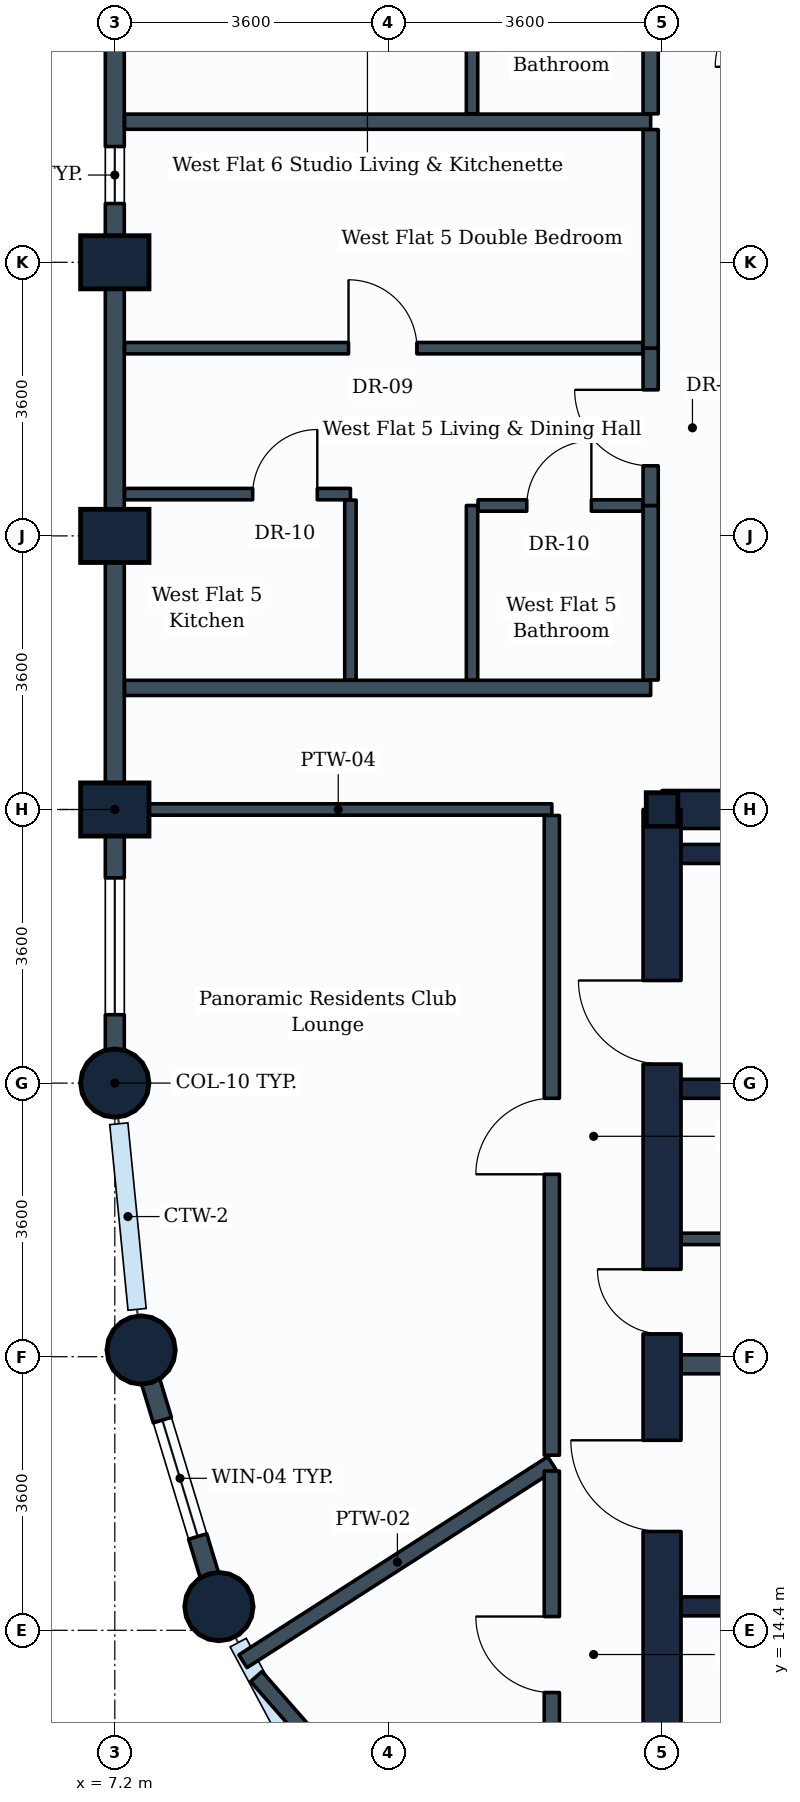
"""IFC4 building model, lengths in metres.
Left out: names, types, materials, properties, quantities, classifications, styles, units other than length and angle.
Written with IfcOpenShell. Run it as: python <this file> out.ifc"""

import sys

from ifc_helpers import new_model, si_unit, direction, frame, frame_2d, origin, origin_2d, place, context, subcontext, project, spatial, rectangle, circle, i_section, extrude, element, fill, save


model = new_model("IFC4")
c1 = context("Model", 3, precision=1e-05, world=origin(), true_north=direction((0.0, 1.0)))
c2 = subcontext(c1, "Body", "Model", "MODEL_VIEW")
j1 = project(units=[si_unit("LENGTHUNIT", "METRE"), si_unit("PLANEANGLEUNIT", "RADIAN")], contexts=[c1])
p1 = place(None, origin())
s1 = spatial("IfcSite", under=j1, at=p1, CompositionType="ELEMENT")
p2 = place(p1, origin())
s2 = spatial("IfcBuilding", under=s1, at=p2, CompositionType="ELEMENT")
p3 = place(p2, frame((0.0, 0.0, 182.4)))
s3 = spatial("IfcBuildingStorey", under=s2, at=p3, CompositionType="ELEMENT", Elevation=182.4)
p4 = place(p3, frame((7.2, 21.6, 0.0), z_axis=(0.0, 0.0, 1.0), x_axis=(1.0, 0.0, 0.0)))
e1 = element("IfcColumn", 1, at=p4, inside=s3, PredefinedType="COLUMN", context=c2, shape_type="SweptSolid", body=[
    extrude(circle(Radius=0.45, at=origin_2d()), origin(), (0.0, 0.0, 1.0), 3.8),
])
for number, where, z_axis, x_axis in (
    (2, (7.2, 25.2, 0.0), (0.0, 0.0, 1.0), (0.0, 1.0, 0.0)),
    (3, (7.2, 28.8, 0.0), (0.0, 0.0, 1.0), (0.0, 1.0, 0.0)),
    (4, (7.2, 32.4, 0.0), (0.0, 0.0, 1.0), (0.0, 1.0, 0.0)),
):
    element("IfcColumn", number, at=place(p3, frame(where, z_axis=z_axis, x_axis=x_axis)), inside=s3, PredefinedType="COLUMN", context=c2, shape_type="SweptSolid", body=[
        extrude(rectangle(XDim=0.7, YDim=0.9, at=origin_2d()), origin(), (0.0, 0.0, 1.0), 3.8),
    ])
for number, where, z_axis, x_axis in (
    (5, (7.546, 18.088, 0.0), (0.0, 0.0, 1.0), (1.0, 0.0, 0.0)),
    (6, (8.57, 14.712, 0.0), (0.0, 0.0, 1.0), (1.0, 0.0, 0.0)),
):
    element("IfcColumn", number, at=place(p3, frame(where, z_axis=z_axis, x_axis=x_axis)), inside=s3, PredefinedType="COLUMN", context=c2, shape_type="SweptSolid", body=[
        extrude(circle(Radius=0.45, at=origin_2d()), origin(), (0.0, 0.0, 1.0), 3.8),
    ])
p5 = place(p3, frame((14.4, 25.2, 0.0), z_axis=(0.0, 0.0, 1.0), x_axis=(1.0, 0.0, 0.0)))
e7 = element("IfcColumn", 7, at=p5, inside=s3, PredefinedType="COLUMN", context=c2, shape_type="SweptSolid", body=[
    extrude(i_section(OverallWidth=0.416, OverallDepth=0.442, WebThickness=0.025, FlangeThickness=0.041, FilletRadius=0.015, at=origin_2d()), origin(), (0.0, 0.0, 1.0), 3.8),
])
p6 = place(p3, frame((7.2, 32.4, 0.0), z_axis=(0.0, 0.0, 1.0), x_axis=(0.0, 1.0, 0.0)))
e8 = element("IfcWall", 8, at=p6, inside=s3, PredefinedType="STANDARD", context=c2, shape_type="SweptSolid", body=[
    extrude(rectangle(XDim=3.6, YDim=0.25, at=frame_2d((1.8, 0.0))), origin(), (0.0, 0.0, 1.0), 2.93),
])
p7 = place(p6, frame((0.773, 0.0, 0.85)))
e9 = element("IfcOpeningElement", 9, at=p7, cuts=e8, PredefinedType="OPENING", context=c2, shape_type="SweptSolid", body=[
    extrude(rectangle(XDim=0.75, YDim=1.05, at=frame_2d((0.375, 0.525))), frame((0.0, 0.135, 0.0), z_axis=(0.0, -1.0, 0.0), x_axis=(1.0, 0.0, 0.0)), (0.0, 0.0, 1.0), 0.27),
])
p8 = place(p3, frame((7.2, 28.8, 0.0), z_axis=(0.0, 0.0, 1.0), x_axis=(0.0, 1.0, 0.0)))
e10 = element("IfcWall", 10, at=p8, inside=s3, PredefinedType="STANDARD", context=c2, shape_type="SweptSolid", body=[
    extrude(rectangle(XDim=3.6, YDim=0.25, at=frame_2d((1.8, 0.0))), origin(), (0.0, 0.0, 1.0), 2.93),
])
p9 = place(p3, frame((7.2, 25.2, 0.0), z_axis=(0.0, 0.0, 1.0), x_axis=(0.0, 1.0, 0.0)))
e11 = element("IfcWall", 11, at=p9, inside=s3, PredefinedType="STANDARD", context=c2, shape_type="SweptSolid", body=[
    extrude(rectangle(XDim=3.6, YDim=0.25, at=frame_2d((1.8, 0.0))), origin(), (0.0, 0.0, 1.0), 2.93),
])
p10 = place(p3, frame((7.2, 21.6, 0.0), z_axis=(0.0, 0.0, 1.0), x_axis=(0.0, 1.0, 0.0)))
e12 = element("IfcWall", 12, at=p10, inside=s3, PredefinedType="STANDARD", context=c2, shape_type="SweptSolid", body=[
    extrude(rectangle(XDim=3.6, YDim=0.25, at=frame_2d((1.8, 0.0))), origin(), (0.0, 0.0, 1.0), 2.93),
])
p11 = place(p10, frame((0.9, 0.0, 0.85)))
e13 = element("IfcOpeningElement", 13, at=p11, cuts=e12, PredefinedType="OPENING", context=c2, shape_type="SweptSolid", body=[
    extrude(rectangle(XDim=1.8, YDim=1.35, at=frame_2d((0.9, 0.675))), frame((0.0, 0.135, 0.0), z_axis=(0.0, -1.0, 0.0), x_axis=(1.0, 0.0, 0.0)), (0.0, 0.0, 1.0), 0.27),
])
p12 = place(p3, frame((8.57, 14.712, 0.0), z_axis=(0.0, 0.0, 1.0), x_axis=(-0.290305086481, 0.956934144423, 0.0)))
e14 = element("IfcWall", 14, at=p12, inside=s3, PredefinedType="STANDARD", context=c2, shape_type="SweptSolid", body=[
    extrude(rectangle(XDim=3.528, YDim=0.25, at=frame_2d((1.764, 0.0))), origin(), (0.0, 0.0, 1.0), 2.93),
])
p13 = place(p12, frame((0.964, 0.0, 0.85)))
e15 = element("IfcOpeningElement", 15, at=p13, cuts=e14, PredefinedType="OPENING", context=c2, shape_type="SweptSolid", body=[
    extrude(rectangle(XDim=1.6, YDim=1.35, at=frame_2d((0.8, 0.675))), frame((0.0, 0.135, 0.0), z_axis=(0.0, -1.0, 0.0), x_axis=(1.0, 0.0, 0.0)), (0.0, 0.0, 1.0), 0.27),
])
p14 = place(p3, frame((14.4, 25.2, 0.0), z_axis=(0.0, 0.0, 1.0), x_axis=(1.0, 0.0, 0.0)))
e16 = element("IfcWall", 16, at=p14, inside=s3, PredefinedType="SHEAR", context=c2, shape_type="SweptSolid", body=[
    extrude(rectangle(XDim=10.8, YDim=0.5, at=frame_2d((5.4, 0.0))), origin(), (0.0, 0.0, 1.0), 3.55),
])
p15 = place(p3, frame((14.4, 10.8, 0.0), z_axis=(0.0, 0.0, 1.0), x_axis=(0.0, 1.0, 0.0)))
e17 = element("IfcWall", 17, at=p15, inside=s3, PredefinedType="SHEAR", context=c2, shape_type="SweptSolid", body=[
    extrude(rectangle(XDim=14.4, YDim=0.5, at=frame_2d((7.2, 0.0))), origin(), (0.0, 0.0, 1.0), 3.55),
])
p16 = place(p15, frame((11.05, 0.0, 0.0)))
e18 = element("IfcOpeningElement", 18, at=p16, cuts=e17, PredefinedType="OPENING", context=c2, shape_type="SweptSolid", body=[
    extrude(rectangle(XDim=1.1, YDim=2.1, at=frame_2d((0.55, 1.05))), frame((0.0, 0.26, 0.0), z_axis=(0.0, -1.0, 0.0), x_axis=(1.0, 0.0, 0.0)), (0.0, 0.0, 1.0), 0.52),
])
p17 = place(p15, frame((4.9, 0.0, 0.0)))
e19 = element("IfcOpeningElement", 19, at=p17, cuts=e17, PredefinedType="OPENING", context=c2, shape_type="SweptSolid", body=[
    extrude(rectangle(XDim=1.2, YDim=2.1, at=frame_2d((0.6, 1.05))), frame((0.0, 0.26, 0.0), z_axis=(0.0, -1.0, 0.0), x_axis=(1.0, 0.0, 0.0)), (0.0, 0.0, 1.0), 0.52),
])
p18 = place(p15, frame((7.5, 0.0, 0.0)))
e20 = element("IfcOpeningElement", 20, at=p18, cuts=e17, PredefinedType="OPENING", context=c2, shape_type="SweptSolid", body=[
    extrude(rectangle(XDim=0.85, YDim=2.1, at=frame_2d((0.425, 1.05))), frame((0.0, 0.26, 0.0), z_axis=(0.0, -1.0, 0.0), x_axis=(1.0, 0.0, 0.0)), (0.0, 0.0, 1.0), 0.52),
])
p19 = place(p3, frame((14.65, 14.715, 0.0), z_axis=(0.0, 0.0, 1.0), x_axis=(1.0, 0.0, 0.0)))
e21 = element("IfcWall", 21, at=p19, inside=s3, PredefinedType="SHEAR", context=c2, shape_type="SweptSolid", body=[
    extrude(rectangle(XDim=8.7, YDim=0.25, at=frame_2d((4.35, 0.0))), origin(), (0.0, 0.0, 1.0), 3.55),
])
p20 = place(p19, frame((0.705, 0.0, 0.0)))
e22 = element("IfcOpeningElement", 22, at=p20, cuts=e21, PredefinedType="OPENING", context=c2, shape_type="SweptSolid", body=[
    extrude(rectangle(XDim=1.1, YDim=2.1, at=frame_2d((0.55, 1.05))), frame((0.0, 0.135, 0.0), z_axis=(0.0, -1.0, 0.0), x_axis=(1.0, 0.0, 0.0)), (0.0, 0.0, 1.0), 0.27),
])
for number, where, z_axis, x_axis in (
    (23, (14.65, 21.525, 0.0), (0.0, 0.0, 1.0), (1.0, 0.0, 0.0)),
    (24, (14.65, 24.615, 0.0), (0.0, 0.0, 1.0), (1.0, 0.0, 0.0)),
):
    element("IfcWall", number, at=place(p3, frame(where, z_axis=z_axis, x_axis=x_axis)), inside=s3, PredefinedType="SHEAR", context=c2, shape_type="SweptSolid", body=[
        extrude(rectangle(XDim=8.25, YDim=0.25, at=frame_2d((4.125, 0.0))), origin(), (0.0, 0.0, 1.0), 3.55),
    ])
p21 = place(p3, frame((14.65, 17.9, 0.0), z_axis=(0.0, 0.0, 1.0), x_axis=(1.0, 0.0, 0.0)))
e25 = element("IfcWall", 25, at=p21, inside=s3, PredefinedType="PARTITIONING", context=c2, shape_type="SweptSolid", body=[
    extrude(rectangle(XDim=7.15, YDim=0.25, at=frame_2d((3.575, 0.0))), origin(), (0.0, 0.0, 1.0), 3.535),
])
p22 = place(p3, frame((14.65, 19.55, 0.0), z_axis=(0.0, 0.0, 1.0), x_axis=(1.0, 0.0, 0.0)))
e26 = element("IfcWall", 26, at=p22, inside=s3, PredefinedType="PARTITIONING", context=c2, shape_type="SweptSolid", body=[
    extrude(rectangle(XDim=8.0, YDim=0.15, at=frame_2d((4.0, 0.0))), origin(), (0.0, 0.0, 1.0), 3.535),
])
p23 = place(p3, frame((7.329, 25.2, 0.0), z_axis=(0.0, 0.0, 1.0), x_axis=(1.0, 0.0, 0.0)))
e27 = element("IfcWall", 27, at=p23, inside=s3, PredefinedType="PARTITIONING", context=c2, shape_type="SweptSolid", body=[
    extrude(rectangle(XDim=5.621, YDim=0.15, at=frame_2d((2.811, 0.0))), origin(), (0.0, 0.0, 1.0), 3.535),
])
p24 = place(p3, frame((12.95, 9.35, 0.0), z_axis=(0.0, 0.0, 1.0), x_axis=(-0.658627575343, 0.752469080426, 0.0)))
e28 = element("IfcWall", 28, at=p24, inside=s3, PredefinedType="PARTITIONING", context=c2, shape_type="SweptSolid", body=[
    extrude(rectangle(XDim=5.903, YDim=0.2, at=frame_2d((2.952, 0.0))), origin(), (0.0, 0.0, 1.0), 2.93),
])
p25 = place(p3, frame((12.95, 16.6, 0.0), z_axis=(0.0, 0.0, 1.0), x_axis=(-0.841684109651, -0.539970239515, 0.0)))
e29 = element("IfcWall", 29, at=p25, inside=s3, PredefinedType="PARTITIONING", context=c2, shape_type="SweptSolid", body=[
    extrude(rectangle(XDim=4.828, YDim=0.2, at=frame_2d((2.414, 0.0))), origin(), (0.0, 0.0, 1.0), 2.93),
])
p26 = place(p3, frame((12.95, 16.704, 0.0), z_axis=(0.0, 0.0, 1.0), x_axis=(0.0, 1.0, 0.0)))
e30 = element("IfcWall", 30, at=p26, inside=s3, PredefinedType="PARTITIONING", context=c2, shape_type="SweptSolid", body=[
    extrude(rectangle(XDim=8.417, YDim=0.2, at=frame_2d((4.208, 0.0))), origin(), (0.0, 0.0, 1.0), 3.22),
])
p27 = place(p26, frame((3.696, 0.0, 0.0)))
e31 = element("IfcOpeningElement", 31, at=p27, cuts=e30, PredefinedType="OPENING", context=c2, shape_type="SweptSolid", body=[
    extrude(rectangle(XDim=1.0, YDim=2.1, at=frame_2d((0.5, 1.05))), frame((0.0, 0.11, 0.0), z_axis=(0.0, -1.0, 0.0), x_axis=(1.0, 0.0, 0.0)), (0.0, 0.0, 1.0), 0.22),
])
p28 = place(p3, frame((12.95, 9.623, 0.0), z_axis=(0.0, 0.0, 1.0), x_axis=(0.0, 1.0, 0.0)))
e32 = element("IfcWall", 32, at=p28, inside=s3, PredefinedType="PARTITIONING", context=c2, shape_type="SweptSolid", body=[
    extrude(rectangle(XDim=6.873, YDim=0.2, at=frame_2d((3.437, 0.0))), origin(), (0.0, 0.0, 1.0), 3.17),
])
p29 = place(p28, frame((3.958, 0.0, 0.0)))
e33 = element("IfcOpeningElement", 33, at=p29, cuts=e32, PredefinedType="OPENING", context=c2, shape_type="SweptSolid", body=[
    extrude(rectangle(XDim=1.0, YDim=2.1, at=frame_2d((0.5, 1.05))), frame((0.0, 0.11, 0.0), z_axis=(0.0, -1.0, 0.0), x_axis=(1.0, 0.0, 0.0)), (0.0, 0.0, 1.0), 0.22),
])
for number, where, z_axis, x_axis in (
    (34, (7.329, 26.8, 0.0), (0.0, 0.0, 1.0), (1.0, 0.0, 0.0)),
    (35, (7.329, 34.25, 0.0), (0.0, 0.0, 1.0), (1.0, 0.0, 0.0)),
):
    element("IfcWall", number, at=place(p3, frame(where, z_axis=z_axis, x_axis=x_axis)), inside=s3, PredefinedType="PARTITIONING", context=c2, shape_type="SweptSolid", body=[
        extrude(rectangle(XDim=6.921, YDim=0.2, at=frame_2d((3.46, 0.0))), origin(), (0.0, 0.0, 1.0), 2.93),
    ])
p30 = place(p3, frame((14.25, 26.904, 0.0), z_axis=(0.0, 0.0, 1.0), x_axis=(0.0, 1.0, 0.0)))
e36 = element("IfcWall", 36, at=p30, inside=s3, PredefinedType="PARTITIONING", context=c2, shape_type="SweptSolid", body=[
    extrude(rectangle(XDim=2.296, YDim=0.2, at=frame_2d((1.148, 0.0))), origin(), (0.0, 0.0, 1.0), 3.17),
])
p31 = place(p3, frame((11.9, 26.904, 0.0), z_axis=(0.0, 0.0, 1.0), x_axis=(0.0, 1.0, 0.0)))
e37 = element("IfcWall", 37, at=p31, inside=s3, PredefinedType="PARTITIONING", context=c2, shape_type="SweptSolid", body=[
    extrude(rectangle(XDim=2.296, YDim=0.15, at=frame_2d((1.148, 0.0))), origin(), (0.0, 0.0, 1.0), 3.22),
])
p32 = place(p3, frame((11.979, 29.2, 0.0), z_axis=(0.0, 0.0, 1.0), x_axis=(1.0, 0.0, 0.0)))
e38 = element("IfcWall", 38, at=p32, inside=s3, PredefinedType="PARTITIONING", context=c2, shape_type="SweptSolid", body=[
    extrude(rectangle(XDim=2.167, YDim=0.15, at=frame_2d((1.083, 0.0))), origin(), (0.0, 0.0, 1.0), 3.535),
])
p33 = place(p32, frame((0.641, 0.0, 0.0)))
e39 = element("IfcOpeningElement", 39, at=p33, cuts=e38, PredefinedType="OPENING", context=c2, shape_type="SweptSolid", body=[
    extrude(rectangle(XDim=0.85, YDim=2.1, at=frame_2d((0.425, 1.05))), frame((0.0, 0.085, 0.0), z_axis=(0.0, -1.0, 0.0), x_axis=(1.0, 0.0, 0.0)), (0.0, 0.0, 1.0), 0.17),
])
p34 = place(p3, frame((14.25, 29.2, 0.0), z_axis=(0.0, 0.0, 1.0), x_axis=(0.0, 1.0, 0.0)))
e40 = element("IfcWall", 40, at=p34, inside=s3, PredefinedType="PARTITIONING", context=c2, shape_type="SweptSolid", body=[
    extrude(rectangle(XDim=2.07, YDim=0.2, at=frame_2d((1.035, 0.0))), origin(), (0.0, 0.0, 1.0), 3.17),
])
p35 = place(p34, frame((0.522, 0.0, 0.0)))
e41 = element("IfcOpeningElement", 41, at=p35, cuts=e40, PredefinedType="OPENING", context=c2, shape_type="SweptSolid", body=[
    extrude(rectangle(XDim=1.0, YDim=2.1, at=frame_2d((0.5, 1.05))), frame((0.0, 0.11, 0.0), z_axis=(0.0, -1.0, 0.0), x_axis=(1.0, 0.0, 0.0)), (0.0, 0.0, 1.0), 0.22),
])
p36 = place(p3, frame((14.25, 31.27, 0.0), z_axis=(0.0, 0.0, 1.0), x_axis=(0.0, 1.0, 0.0)))
e42 = element("IfcWall", 42, at=p36, inside=s3, PredefinedType="PARTITIONING", context=c2, shape_type="SweptSolid", body=[
    extrude(rectangle(XDim=2.876, YDim=0.2, at=frame_2d((1.438, 0.0))), origin(), (0.0, 0.0, 1.0), 3.17),
])
p37 = place(p3, frame((7.329, 31.27, 0.0), z_axis=(0.0, 0.0, 1.0), x_axis=(1.0, 0.0, 0.0)))
e43 = element("IfcWall", 43, at=p37, inside=s3, PredefinedType="PARTITIONING", context=c2, shape_type="SweptSolid", body=[
    extrude(rectangle(XDim=6.817, YDim=0.15, at=frame_2d((3.408, 0.0))), origin(), (0.0, 0.0, 1.0), 2.93),
])
p38 = place(p37, frame((2.946, 0.0, 0.0)))
e44 = element("IfcOpeningElement", 44, at=p38, cuts=e43, PredefinedType="OPENING", context=c2, shape_type="SweptSolid", body=[
    extrude(rectangle(XDim=0.9, YDim=2.1, at=frame_2d((0.45, 1.05))), frame((0.0, 0.085, 0.0), z_axis=(0.0, -1.0, 0.0), x_axis=(1.0, 0.0, 0.0)), (0.0, 0.0, 1.0), 0.17),
])
p39 = place(p3, frame((7.329, 29.35, 0.0), z_axis=(0.0, 0.0, 1.0), x_axis=(1.0, 0.0, 0.0)))
e45 = element("IfcWall", 45, at=p39, inside=s3, PredefinedType="PARTITIONING", context=c2, shape_type="SweptSolid", body=[
    extrude(rectangle(XDim=2.971, YDim=0.15, at=frame_2d((1.485, 0.0))), origin(), (0.0, 0.0, 1.0), 2.93),
])
p40 = place(p39, frame((1.685, 0.0, 0.0)))
e46 = element("IfcOpeningElement", 46, at=p40, cuts=e45, PredefinedType="OPENING", context=c2, shape_type="SweptSolid", body=[
    extrude(rectangle(XDim=0.85, YDim=2.1, at=frame_2d((0.425, 1.05))), frame((0.0, 0.085, 0.0), z_axis=(0.0, -1.0, 0.0), x_axis=(1.0, 0.0, 0.0)), (0.0, 0.0, 1.0), 0.17),
])
p41 = place(p3, frame((10.3, 26.904, 0.0), z_axis=(0.0, 0.0, 1.0), x_axis=(0.0, 1.0, 0.0)))
e47 = element("IfcWall", 47, at=p41, inside=s3, PredefinedType="PARTITIONING", context=c2, shape_type="SweptSolid", body=[
    extrude(rectangle(XDim=2.367, YDim=0.15, at=frame_2d((1.184, 0.0))), origin(), (0.0, 0.0, 1.0), 3.22),
])
p42 = place(p3, frame((14.25, 34.354, 0.0), z_axis=(0.0, 0.0, 1.0), x_axis=(0.0, 1.0, 0.0)))
e48 = element("IfcWall", 48, at=p42, inside=s3, PredefinedType="PARTITIONING", context=c2, shape_type="SweptSolid", body=[
    extrude(rectangle(XDim=2.296, YDim=0.2, at=frame_2d((1.148, 0.0))), origin(), (0.0, 0.0, 1.0), 3.535),
])
p43 = place(p3, frame((11.9, 34.354, 0.0), z_axis=(0.0, 0.0, 1.0), x_axis=(0.0, 1.0, 0.0)))
e49 = element("IfcWall", 49, at=p43, inside=s3, PredefinedType="PARTITIONING", context=c2, shape_type="SweptSolid", body=[
    extrude(rectangle(XDim=2.296, YDim=0.15, at=frame_2d((1.148, 0.0))), origin(), (0.0, 0.0, 1.0), 3.535),
])
p44 = place(p11, origin())
e50 = element("IfcWindow", 50, at=p44, inside=s3, PartitioningType="SINGLE_PANEL", PredefinedType="WINDOW", context=c2, shape_type="SweptSolid", body=[
    extrude(rectangle(XDim=1.8, YDim=1.35, at=frame_2d((0.9, 0.675))), frame((0.0, 0.03, 0.0), z_axis=(0.0, -1.0, 0.0), x_axis=(1.0, 0.0, 0.0)), (0.0, 0.0, 1.0), 0.06),
])
fill(e13, e50)
p45 = place(p13, origin())
e51 = element("IfcWindow", 51, at=p45, inside=s3, PartitioningType="SINGLE_PANEL", PredefinedType="WINDOW", context=c2, shape_type="SweptSolid", body=[
    extrude(rectangle(XDim=1.6, YDim=1.35, at=frame_2d((0.8, 0.675))), frame((0.0, 0.03, 0.0), z_axis=(0.0, -1.0, 0.0), x_axis=(1.0, 0.0, 0.0)), (0.0, 0.0, 1.0), 0.06),
])
fill(e15, e51)
p46 = place(p16, origin())
e52 = element("IfcDoor", 52, at=p46, inside=s3, OperationType="SINGLE_SWING_RIGHT", PredefinedType="DOOR", context=c2, shape_type="SweptSolid", body=[
    extrude(rectangle(XDim=1.1, YDim=2.1, at=frame_2d((0.55, 1.05))), frame((0.0, 0.025, 0.0), z_axis=(0.0, -1.0, 0.0), x_axis=(1.0, 0.0, 0.0)), (0.0, 0.0, 1.0), 0.05),
])
fill(e18, e52)
p47 = place(p17, origin())
e53 = element("IfcDoor", 53, at=p47, inside=s3, OperationType="SINGLE_SWING_RIGHT", PredefinedType="DOOR", context=c2, shape_type="SweptSolid", body=[
    extrude(rectangle(XDim=1.2, YDim=2.1, at=frame_2d((0.6, 1.05))), frame((0.0, 0.025, 0.0), z_axis=(0.0, -1.0, 0.0), x_axis=(1.0, 0.0, 0.0)), (0.0, 0.0, 1.0), 0.05),
])
fill(e19, e53)
p48 = place(p18, origin())
e54 = element("IfcDoor", 54, at=p48, inside=s3, OperationType="SINGLE_SWING_RIGHT", PredefinedType="DOOR", context=c2, shape_type="SweptSolid", body=[
    extrude(rectangle(XDim=0.85, YDim=2.1, at=frame_2d((0.425, 1.05))), frame((0.0, 0.025, 0.0), z_axis=(0.0, -1.0, 0.0), x_axis=(1.0, 0.0, 0.0)), (0.0, 0.0, 1.0), 0.05),
])
fill(e20, e54)
p49 = place(p27, origin())
e55 = element("IfcDoor", 55, at=p49, inside=s3, OperationType="SINGLE_SWING_LEFT", PredefinedType="DOOR", context=c2, shape_type="SweptSolid", body=[
    extrude(rectangle(XDim=1.0, YDim=2.1, at=frame_2d((0.5, 1.05))), frame((0.0, 0.025, 0.0), z_axis=(0.0, -1.0, 0.0), x_axis=(1.0, 0.0, 0.0)), (0.0, 0.0, 1.0), 0.05),
])
fill(e31, e55)
p50 = place(p29, origin())
e56 = element("IfcDoor", 56, at=p50, inside=s3, OperationType="SINGLE_SWING_RIGHT", PredefinedType="DOOR", context=c2, shape_type="SweptSolid", body=[
    extrude(rectangle(XDim=1.0, YDim=2.1, at=frame_2d((0.5, 1.05))), frame((0.0, 0.025, 0.0), z_axis=(0.0, -1.0, 0.0), x_axis=(1.0, 0.0, 0.0)), (0.0, 0.0, 1.0), 0.05),
])
fill(e33, e56)
p51 = place(p33, origin())
e57 = element("IfcDoor", 57, at=p51, inside=s3, OperationType="SINGLE_SWING_RIGHT", PredefinedType="DOOR", context=c2, shape_type="SweptSolid", body=[
    extrude(rectangle(XDim=0.85, YDim=2.1, at=frame_2d((0.425, 1.05))), frame((0.0, 0.025, 0.0), z_axis=(0.0, -1.0, 0.0), x_axis=(1.0, 0.0, 0.0)), (0.0, 0.0, 1.0), 0.05),
])
fill(e39, e57)
p52 = place(p35, origin())
e58 = element("IfcDoor", 58, at=p52, inside=s3, OperationType="SINGLE_SWING_RIGHT", PredefinedType="DOOR", context=c2, shape_type="SweptSolid", body=[
    extrude(rectangle(XDim=1.0, YDim=2.1, at=frame_2d((0.5, 1.05))), frame((0.0, 0.025, 0.0), z_axis=(0.0, -1.0, 0.0), x_axis=(1.0, 0.0, 0.0)), (0.0, 0.0, 1.0), 0.05),
])
fill(e41, e58)
p53 = place(p38, origin())
e59 = element("IfcDoor", 59, at=p53, inside=s3, OperationType="SINGLE_SWING_LEFT", PredefinedType="DOOR", context=c2, shape_type="SweptSolid", body=[
    extrude(rectangle(XDim=0.9, YDim=2.1, at=frame_2d((0.45, 1.05))), frame((0.0, 0.025, 0.0), z_axis=(0.0, -1.0, 0.0), x_axis=(1.0, 0.0, 0.0)), (0.0, 0.0, 1.0), 0.05),
])
fill(e44, e59)
p54 = place(p40, origin())
e60 = element("IfcDoor", 60, at=p54, inside=s3, OperationType="SINGLE_SWING_RIGHT", PredefinedType="DOOR", context=c2, shape_type="SweptSolid", body=[
    extrude(rectangle(XDim=0.85, YDim=2.1, at=frame_2d((0.425, 1.05))), frame((0.0, 0.025, 0.0), z_axis=(0.0, -1.0, 0.0), x_axis=(1.0, 0.0, 0.0)), (0.0, 0.0, 1.0), 0.05),
])
fill(e46, e60)
p55 = place(p7, origin())
e61 = element("IfcWindow", 61, at=p55, inside=s3, PartitioningType="SINGLE_PANEL", PredefinedType="WINDOW", context=c2, shape_type="SweptSolid", body=[
    extrude(rectangle(XDim=0.75, YDim=1.05, at=frame_2d((0.375, 0.525))), frame((0.0, 0.03, 0.0), z_axis=(0.0, -1.0, 0.0), x_axis=(1.0, 0.0, 0.0)), (0.0, 0.0, 1.0), 0.06),
])
fill(e9, e61)
save(model, sys.argv[1])
